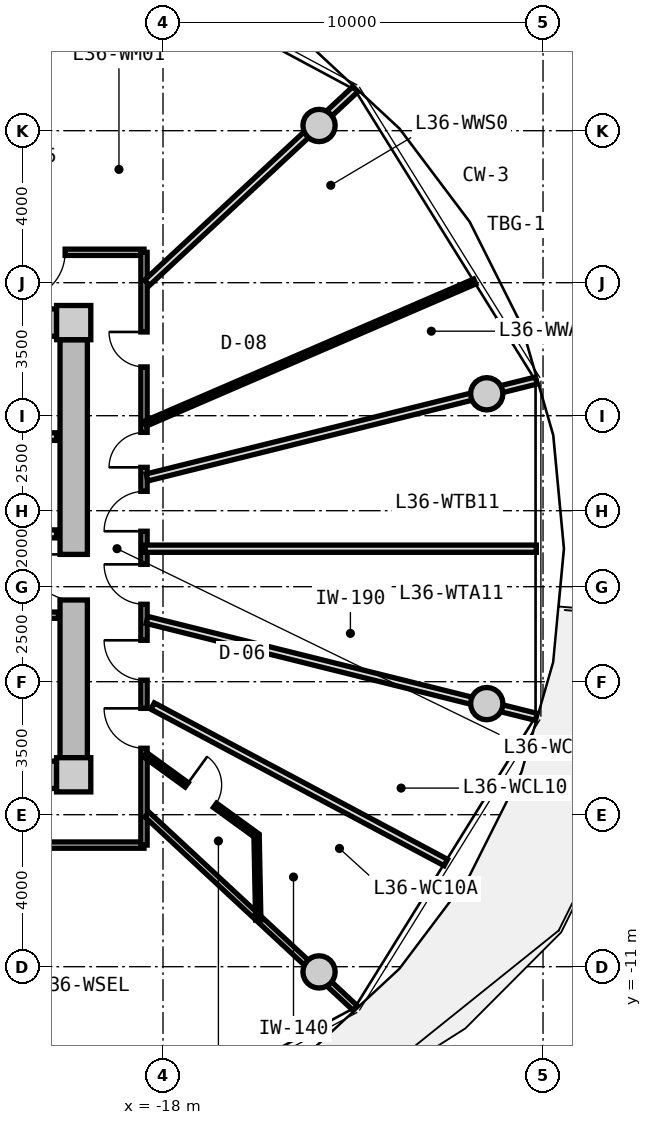
"""IFC4 building model, lengths in metres.
Left out: names, types, materials, properties, quantities, classifications, styles, units other than length and angle.
Written with IfcOpenShell. Run it as: python <this file> out.ifc"""

import sys

from ifc_helpers import new_model, si_unit, direction, frame, frame_2d, origin, origin_2d, place, context, subcontext, project, spatial, rectangle, circle, extrude, source, transform, mapped, element, fill, save


model = new_model("IFC4")
c1 = context("Model", 3, precision=1e-05, world=origin(), true_north=direction((0.0, 1.0)))
c2 = subcontext(c1, "Body", "Model", "MODEL_VIEW")
j1 = project(units=[si_unit("LENGTHUNIT", "METRE"), si_unit("PLANEANGLEUNIT", "RADIAN")], contexts=[c1])
p1 = place(None, origin())
s1 = spatial("IfcSite", under=j1, at=p1, CompositionType="ELEMENT")
p2 = place(p1, origin())
s2 = spatial("IfcBuilding", under=s1, at=p2, CompositionType="ELEMENT")
p3 = place(p2, frame((0.0, 0.0, 117.6)))
s3 = spatial("IfcBuildingStorey", under=s2, at=p3, CompositionType="ELEMENT", Elevation=117.6)
m1 = source(origin(), c2, "Body", "SweptSolid", [
    extrude(rectangle(XDim=0.9, YDim=0.9, at=origin_2d()), origin(), (0.0, 0.0, 1.0), 3.05),
])
for number, where, z_axis, x_axis in (
    (1, (-20.35, -5.95, 0.0), (0.0, 0.0, 1.0), (1.0, 0.0, 0.0)),
    (2, (-20.35, 5.95, 0.0), (0.0, 0.0, 1.0), (1.0, 0.0, 0.0)),
):
    element("IfcColumn", number, at=place(p3, frame(where, z_axis=z_axis, x_axis=x_axis)), inside=s3, PredefinedType="COLUMN", context=c2, shape_type="MappedRepresentation", body=[
        mapped(m1, transform((0.0, 0.0, 0.0), x_axis=(1.0, 0.0, 0.0), y_axis=(0.0, 1.0, 0.0), z_axis=(0.0, 0.0, 1.0), scale=1.0)),
    ])
m2 = source(origin(), c2, "Body", "SweptSolid", [
    extrude(rectangle(XDim=14.4, YDim=0.72, at=frame_2d((7.2, 0.0))), origin(), (0.0, 0.0, 1.0), 2.79),
])
for number, where, z_axis, x_axis in (
    (3, (-35.2, 5.95, 0.0), (0.0, 0.0, 1.0), (1.0, 0.0, 0.0)),
    (4, (-20.8, -5.95, 0.0), (0.0, 0.0, 1.0), (-1.0, 0.0, 0.0)),
):
    element("IfcWall", number, at=place(p3, frame(where, z_axis=z_axis, x_axis=x_axis)), inside=s3, PredefinedType="SHEAR", context=c2, shape_type="MappedRepresentation", body=[
        mapped(m2, transform((0.0, 0.0, 0.0), x_axis=(1.0, 0.0, 0.0), y_axis=(0.0, 1.0, 0.0), z_axis=(0.0, 0.0, 1.0), scale=1.0)),
    ])
m3 = source(origin(), c2, "Body", "SweptSolid", [
    extrude(rectangle(XDim=11.0, YDim=0.72, at=frame_2d((5.5, 0.0))), origin(), (0.0, 0.0, 1.0), 2.79),
])
p4 = place(p3, frame((-20.35, 5.5, 0.0), z_axis=(0.0, 0.0, 1.0), x_axis=(0.0, -1.0, 0.0)))
e5 = element("IfcWall", 5, at=p4, inside=s3, PredefinedType="SHEAR", context=c2, shape_type="MappedRepresentation", body=[
    mapped(m3, transform((0.0, 0.0, 0.0), x_axis=(1.0, 0.0, 0.0), y_axis=(0.0, 1.0, 0.0), z_axis=(0.0, 0.0, 1.0), scale=1.0)),
])
p5 = place(p4, frame((5.65, 0.0, 0.0)))
e6 = element("IfcOpeningElement", 6, at=p5, cuts=e5, PredefinedType="OPENING", context=c2, shape_type="SweptSolid", body=[
    extrude(rectangle(XDim=1.2, YDim=2.15, at=frame_2d((0.6, 1.075))), frame((0.0, 0.37, 0.0), z_axis=(0.0, -1.0, 0.0), x_axis=(1.0, 0.0, 0.0)), (0.0, 0.0, 1.0), 0.74),
])
m4 = source(origin(), c2, "Body", "SweptSolid", [
    extrude(circle(Radius=0.425, at=origin_2d()), origin(), (0.0, 0.0, 1.0), 3.05),
])
for number, where, z_axis, x_axis in (
    (7, (-9.481, 4.076, 0.0), (0.0, 0.0, 1.0), (1.0, 0.0, 0.0)),
    (8, (-13.894, 11.137, 0.0), (0.0, 0.0, 1.0), (1.0, 0.0, 0.0)),
    (9, (-13.894, -11.137, 0.0), (0.0, 0.0, 1.0), (1.0, 0.0, 0.0)),
    (10, (-9.481, -4.076, 0.0), (0.0, 0.0, 1.0), (1.0, 0.0, 0.0)),
):
    element("IfcColumn", number, at=place(p3, frame(where, z_axis=z_axis, x_axis=x_axis)), inside=s3, PredefinedType="COLUMN", context=c2, shape_type="MappedRepresentation", body=[
        mapped(m4, transform((0.0, 0.0, 0.0), x_axis=(1.0, 0.0, 0.0), y_axis=(0.0, 1.0, 0.0), z_axis=(0.0, 0.0, 1.0), scale=1.0)),
    ])
m5 = source(origin(), c2, "Body", "SweptSolid", [
    extrude(rectangle(XDim=3.2, YDim=0.2, at=frame_2d((1.6, 0.0))), origin(), (0.0, 0.0, 1.0), 2.775),
])
p6 = place(p3, frame((-24.0, 2.95, 0.0), z_axis=(0.0, 0.0, 1.0), x_axis=(1.0, 0.0, 0.0)))
e11 = element("IfcWall", 11, at=p6, inside=s3, PredefinedType="PARTITIONING", context=c2, shape_type="MappedRepresentation", body=[
    mapped(m5, transform((0.0, 0.0, 0.0), x_axis=(1.0, 0.0, 0.0), y_axis=(0.0, 1.0, 0.0), z_axis=(0.0, 0.0, 1.0), scale=1.0)),
])
m6 = source(origin(), c2, "Body", "SweptSolid", [
    extrude(rectangle(XDim=6.66, YDim=0.21, at=frame_2d((3.33, 0.0))), origin(), (0.0, 0.0, 1.0), 2.775),
])
p7 = place(p3, frame((-27.46, 0.39, 0.0), z_axis=(0.0, 0.0, 1.0), x_axis=(1.0, 0.0, 0.0)))
e12 = element("IfcWall", 12, at=p7, inside=s3, PredefinedType="PARTITIONING", context=c2, shape_type="MappedRepresentation", body=[
    mapped(m6, transform((0.0, 0.0, 0.0), x_axis=(1.0, 0.0, 0.0), y_axis=(0.0, 1.0, 0.0), z_axis=(0.0, 0.0, 1.0), scale=1.0)),
])
p8 = place(p7, frame((1.0, 0.0, 0.0)))
e13 = element("IfcOpeningElement", 13, at=p8, cuts=e12, PredefinedType="OPENING", context=c2, shape_type="SweptSolid", body=[
    extrude(rectangle(XDim=1.2, YDim=2.15, at=frame_2d((0.6, 1.075))), frame((0.0, 0.115, 0.0), z_axis=(0.0, -1.0, 0.0), x_axis=(1.0, 0.0, 0.0)), (0.0, 0.0, 1.0), 0.23),
])
m7 = source(origin(), c2, "Body", "SweptSolid", [
    extrude(rectangle(XDim=2.7, YDim=0.165, at=frame_2d((1.35, 0.0))), origin(), (0.0, 0.0, 1.0), 2.775),
])
p9 = place(p3, frame((-23.45, -1.75, 0.0), z_axis=(0.0, 0.0, 1.0), x_axis=(1.0, 0.0, 0.0)))
e14 = element("IfcWall", 14, at=p9, inside=s3, PredefinedType="PARTITIONING", context=c2, shape_type="MappedRepresentation", body=[
    mapped(m7, transform((0.0, 0.0, 0.0), x_axis=(1.0, 0.0, 0.0), y_axis=(0.0, 1.0, 0.0), z_axis=(0.0, 0.0, 1.0), scale=1.0)),
])
p10 = place(p9, frame((0.85, 0.0, 0.0)))
e15 = element("IfcOpeningElement", 15, at=p10, cuts=e14, PredefinedType="OPENING", context=c2, shape_type="SweptSolid", body=[
    extrude(rectangle(XDim=0.925, YDim=2.1, at=frame_2d((0.462, 1.05))), frame((0.0, 0.093, 0.0), z_axis=(0.0, -1.0, 0.0), x_axis=(1.0, 0.0, 0.0)), (0.0, 0.0, 1.0), 0.185),
])
m8 = source(origin(), c2, "Body", "SweptSolid", [
    extrude(rectangle(XDim=8.6, YDim=0.165, at=frame_2d((4.3, 0.0))), origin(), (0.0, 0.0, 1.0), 2.775),
])
p11 = place(p3, frame((-27.1, 7.8, 0.0), z_axis=(0.0, 0.0, 1.0), x_axis=(1.0, 0.0, 0.0)))
e16 = element("IfcWall", 16, at=p11, inside=s3, PredefinedType="PARTITIONING", context=c2, shape_type="MappedRepresentation", body=[
    mapped(m8, transform((0.0, 0.0, 0.0), x_axis=(1.0, 0.0, 0.0), y_axis=(0.0, 1.0, 0.0), z_axis=(0.0, 0.0, 1.0), scale=1.0)),
])
p12 = place(p11, frame((5.275, 0.0, 0.0)))
e17 = element("IfcOpeningElement", 17, at=p12, cuts=e16, PredefinedType="OPENING", context=c2, shape_type="SweptSolid", body=[
    extrude(rectangle(XDim=1.25, YDim=2.2, at=frame_2d((0.625, 1.1))), frame((0.0, 0.093, 0.0), z_axis=(0.0, -1.0, 0.0), x_axis=(1.0, 0.0, 0.0)), (0.0, 0.0, 1.0), 0.185),
])
p13 = place(p3, frame((-18.5, -7.8, 0.0), z_axis=(0.0, 0.0, 1.0), x_axis=(-1.0, 0.0, 0.0)))
e18 = element("IfcWall", 18, at=p13, inside=s3, PredefinedType="PARTITIONING", context=c2, shape_type="MappedRepresentation", body=[
    mapped(m8, transform((0.0, 0.0, 0.0), x_axis=(1.0, 0.0, 0.0), y_axis=(0.0, 1.0, 0.0), z_axis=(0.0, 0.0, 1.0), scale=1.0)),
])
p14 = place(p13, frame((3.775, 0.0, 0.0)))
e19 = element("IfcOpeningElement", 19, at=p14, cuts=e18, PredefinedType="OPENING", context=c2, shape_type="SweptSolid", body=[
    extrude(rectangle(XDim=1.05, YDim=2.15, at=frame_2d((0.525, 1.075))), frame((0.0, 0.093, 0.0), z_axis=(0.0, -1.0, 0.0), x_axis=(1.0, 0.0, 0.0)), (0.0, 0.0, 1.0), 0.185),
])
m9 = source(origin(), c2, "Body", "SweptSolid", [
    extrude(rectangle(XDim=15.6, YDim=0.165, at=frame_2d((7.8, 0.0))), origin(), (0.0, 0.0, 1.0), 2.775),
])
p15 = place(p3, frame((-18.5, 7.8, 0.0), z_axis=(0.0, 0.0, 1.0), x_axis=(0.0, -1.0, 0.0)))
e20 = element("IfcWall", 20, at=p15, inside=s3, PredefinedType="PARTITIONING", context=c2, shape_type="MappedRepresentation", body=[
    mapped(m9, transform((0.0, 0.0, 0.0), x_axis=(1.0, 0.0, 0.0), y_axis=(0.0, 1.0, 0.0), z_axis=(0.0, 0.0, 1.0), scale=1.0)),
])
p16 = place(p15, frame((12.002, 0.0, 0.0)))
e21 = element("IfcOpeningElement", 21, at=p16, cuts=e20, PredefinedType="OPENING", context=c2, shape_type="SweptSolid", body=[
    extrude(rectangle(XDim=1.05, YDim=2.15, at=frame_2d((0.525, 1.075))), frame((0.0, 0.093, 0.0), z_axis=(0.0, -1.0, 0.0), x_axis=(1.0, 0.0, 0.0)), (0.0, 0.0, 1.0), 0.185),
])
p17 = place(p15, frame((10.211, 0.0, 0.0)))
e22 = element("IfcOpeningElement", 22, at=p17, cuts=e20, PredefinedType="OPENING", context=c2, shape_type="SweptSolid", body=[
    extrude(rectangle(XDim=1.05, YDim=2.15, at=frame_2d((0.525, 1.075))), frame((0.0, 0.093, 0.0), z_axis=(0.0, -1.0, 0.0), x_axis=(1.0, 0.0, 0.0)), (0.0, 0.0, 1.0), 0.185),
])
p18 = place(p15, frame((8.212, 0.0, 0.0)))
e23 = element("IfcOpeningElement", 23, at=p18, cuts=e20, PredefinedType="OPENING", context=c2, shape_type="SweptSolid", body=[
    extrude(rectangle(XDim=1.05, YDim=2.15, at=frame_2d((0.525, 1.075))), frame((0.0, 0.093, 0.0), z_axis=(0.0, -1.0, 0.0), x_axis=(1.0, 0.0, 0.0)), (0.0, 0.0, 1.0), 0.185),
])
p19 = place(p15, frame((6.291, 0.0, 0.0)))
e24 = element("IfcOpeningElement", 24, at=p19, cuts=e20, PredefinedType="OPENING", context=c2, shape_type="SweptSolid", body=[
    extrude(rectangle(XDim=1.05, YDim=2.15, at=frame_2d((0.525, 1.075))), frame((0.0, 0.093, 0.0), z_axis=(0.0, -1.0, 0.0), x_axis=(1.0, 0.0, 0.0)), (0.0, 0.0, 1.0), 0.185),
])
p20 = place(p15, frame((4.739, 0.0, 0.0)))
e25 = element("IfcOpeningElement", 25, at=p20, cuts=e20, PredefinedType="OPENING", context=c2, shape_type="SweptSolid", body=[
    extrude(rectangle(XDim=0.92, YDim=2.1, at=frame_2d((0.46, 1.05))), frame((0.0, 0.093, 0.0), z_axis=(0.0, -1.0, 0.0), x_axis=(1.0, 0.0, 0.0)), (0.0, 0.0, 1.0), 0.185),
])
p21 = place(p15, frame((2.096, 0.0, 0.0)))
e26 = element("IfcOpeningElement", 26, at=p21, cuts=e20, PredefinedType="OPENING", context=c2, shape_type="SweptSolid", body=[
    extrude(rectangle(XDim=0.92, YDim=2.1, at=frame_2d((0.46, 1.05))), frame((0.0, 0.093, 0.0), z_axis=(0.0, -1.0, 0.0), x_axis=(1.0, 0.0, 0.0)), (0.0, 0.0, 1.0), 0.185),
])
m10 = source(origin(), c2, "Body", "SweptSolid", [
    extrude(rectangle(XDim=7.482, YDim=0.165, at=frame_2d((3.741, 0.0))), origin(), (0.0, 0.0, 1.0), 2.275),
])
p22 = place(p3, frame((-18.42, -6.998, 0.0), z_axis=(0.0, 0.0, 1.0), x_axis=(0.732508698043, -0.680757671489, 0.0)))
e27 = element("IfcWall", 27, at=p22, inside=s3, PredefinedType="PARTITIONING", context=c2, shape_type="MappedRepresentation", body=[
    mapped(m10, transform((0.0, 0.0, 0.0), x_axis=(1.0, 0.0, 0.0), y_axis=(0.0, 1.0, 0.0), z_axis=(0.0, 0.0, 1.0), scale=1.0)),
])
m11 = source(origin(), c2, "Body", "SweptSolid", [
    extrude(rectangle(XDim=10.556, YDim=0.19, at=frame_2d((5.278, 0.0))), origin(), (0.0, 0.0, 1.0), 2.275),
])
p23 = place(p3, frame((-18.42, -1.875, 0.0), z_axis=(0.0, 0.0, 1.0), x_axis=(0.970363857851, -0.241648470667, 0.0)))
e28 = element("IfcWall", 28, at=p23, inside=s3, PredefinedType="PARTITIONING", context=c2, shape_type="MappedRepresentation", body=[
    mapped(m11, transform((0.0, 0.0, 0.0), x_axis=(1.0, 0.0, 0.0), y_axis=(0.0, 1.0, 0.0), z_axis=(0.0, 0.0, 1.0), scale=1.0)),
])
m12 = source(origin(), c2, "Body", "SweptSolid", [
    extrude(rectangle(XDim=8.744, YDim=0.19, at=frame_2d((4.372, 0.0))), origin(), (0.0, 0.0, 1.0), 2.775),
])
p24 = place(p3, frame((-18.273, -4.142, 0.0), z_axis=(0.0, 0.0, 1.0), x_axis=(0.882252449936, -0.470776607938, 0.0)))
e29 = element("IfcWall", 29, at=p24, inside=s3, PredefinedType="PARTITIONING", context=c2, shape_type="MappedRepresentation", body=[
    mapped(m12, transform((0.0, 0.0, 0.0), x_axis=(1.0, 0.0, 0.0), y_axis=(0.0, 1.0, 0.0), z_axis=(0.0, 0.0, 1.0), scale=1.0)),
])
m13 = source(origin(), c2, "Body", "SweptSolid", [
    extrude(rectangle(XDim=3.621, YDim=0.14, at=frame_2d((1.811, 0.0))), origin(), (0.0, 0.0, 1.0), 2.775),
])
p25 = place(p3, frame((-18.47, -5.422, 0.0), z_axis=(0.0, 0.0, 1.0), x_axis=(0.80968252222, -0.586868139544, 0.0)))
e30 = element("IfcWall", 30, at=p25, inside=s3, PredefinedType="PARTITIONING", context=c2, shape_type="MappedRepresentation", body=[
    mapped(m13, transform((0.0, 0.0, 0.0), x_axis=(1.0, 0.0, 0.0), y_axis=(0.0, 1.0, 0.0), z_axis=(0.0, 0.0, 1.0), scale=1.0)),
])
p26 = place(p25, frame((1.351, 0.0, 0.0)))
e31 = element("IfcOpeningElement", 31, at=p26, cuts=e30, PredefinedType="OPENING", context=c2, shape_type="SweptSolid", body=[
    extrude(rectangle(XDim=0.92, YDim=2.1, at=frame_2d((0.46, 1.05))), frame((0.0, 0.08, 0.0), z_axis=(0.0, -1.0, 0.0), x_axis=(1.0, 0.0, 0.0)), (0.0, 0.0, 1.0), 0.16),
])
m14 = source(origin(), c2, "Body", "SweptSolid", [
    extrude(rectangle(XDim=2.225, YDim=0.14, at=frame_2d((1.112, 0.0))), origin(), (0.0, 0.0, 1.0), 2.775),
])
p27 = place(p3, frame((-15.538, -7.547, 0.0), z_axis=(0.0, 0.0, 1.0), x_axis=(0.019971869027, -0.999800542332, 0.0)))
e32 = element("IfcWall", 32, at=p27, inside=s3, PredefinedType="PARTITIONING", context=c2, shape_type="MappedRepresentation", body=[
    mapped(m14, transform((0.0, 0.0, 0.0), x_axis=(1.0, 0.0, 0.0), y_axis=(0.0, 1.0, 0.0), z_axis=(0.0, 0.0, 1.0), scale=1.0)),
])
p28 = place(p3, frame((-18.42, 1.875, 0.0), z_axis=(0.0, 0.0, 1.0), x_axis=(0.970363857851, 0.241648470667, 0.0)))
e33 = element("IfcWall", 33, at=p28, inside=s3, PredefinedType="PARTITIONING", context=c2, shape_type="MappedRepresentation", body=[
    mapped(m11, transform((0.0, 0.0, 0.0), x_axis=(1.0, 0.0, 0.0), y_axis=(0.0, 1.0, 0.0), z_axis=(0.0, 0.0, 1.0), scale=1.0)),
])
m15 = source(origin(), c2, "Body", "SweptSolid", [
    extrude(rectangle(XDim=10.293, YDim=0.19, at=frame_2d((5.146, 0.0))), origin(), (0.0, 0.0, 1.0), 2.775),
])
p29 = place(p3, frame((-18.47, 0.0, 0.0), z_axis=(0.0, 0.0, 1.0), x_axis=(1.0, 0.0, 0.0)))
e34 = element("IfcWall", 34, at=p29, inside=s3, PredefinedType="PARTITIONING", context=c2, shape_type="MappedRepresentation", body=[
    mapped(m15, transform((0.0, 0.0, 0.0), x_axis=(1.0, 0.0, 0.0), y_axis=(0.0, 1.0, 0.0), z_axis=(0.0, 0.0, 1.0), scale=1.0)),
])
m16 = source(origin(), c2, "Body", "SweptSolid", [
    extrude(rectangle(XDim=7.482, YDim=0.19, at=frame_2d((3.741, 0.0))), origin(), (0.0, 0.0, 1.0), 2.275),
])
p30 = place(p3, frame((-18.42, 6.998, 0.0), z_axis=(0.0, 0.0, 1.0), x_axis=(0.732508698043, 0.680757671489, 0.0)))
e35 = element("IfcWall", 35, at=p30, inside=s3, PredefinedType="PARTITIONING", context=c2, shape_type="MappedRepresentation", body=[
    mapped(m16, transform((0.0, 0.0, 0.0), x_axis=(1.0, 0.0, 0.0), y_axis=(0.0, 1.0, 0.0), z_axis=(0.0, 0.0, 1.0), scale=1.0)),
])
m17 = source(origin(), c2, "Body", "SweptSolid", [
    extrude(rectangle(XDim=9.447, YDim=0.14, at=frame_2d((4.724, 0.0))), origin(), (0.0, 0.0, 1.0), 2.775),
])
p31 = place(p3, frame((-18.47, 3.289, 0.0), z_axis=(0.0, 0.0, 1.0), x_axis=(0.918162367414, 0.396204324894, 0.0)))
e36 = element("IfcWall", 36, at=p31, inside=s3, PredefinedType="PARTITIONING", context=c2, shape_type="MappedRepresentation", body=[
    mapped(m17, transform((0.0, 0.0, 0.0), x_axis=(1.0, 0.0, 0.0), y_axis=(0.0, 1.0, 0.0), z_axis=(0.0, 0.0, 1.0), scale=1.0)),
])
m18 = source(origin(), c2, "Body", "SweptSolid", [
    extrude(rectangle(XDim=1.2, YDim=2.15, at=frame_2d((0.6, 1.075))), frame((0.0, 0.025, 0.0), z_axis=(0.0, -1.0, 0.0), x_axis=(1.0, 0.0, 0.0)), (0.0, 0.0, 1.0), 0.05),
])
p32 = place(p5, frame((1.2, 0.0, 0.0), z_axis=(0.0, 0.0, 1.0), x_axis=(-1.0, 0.0, 0.0)))
e37 = element("IfcDoor", 37, at=p32, inside=s3, OperationType="SINGLE_SWING_RIGHT", PredefinedType="DOOR", context=c2, shape_type="MappedRepresentation", body=[
    mapped(m18, transform((0.0, 0.0, 0.0), x_axis=(1.0, 0.0, 0.0), y_axis=(0.0, 1.0, 0.0), z_axis=(0.0, 0.0, 1.0), scale=1.0)),
])
fill(e6, e37)
m19 = source(origin(), c2, "Body", "SweptSolid", [
    extrude(rectangle(XDim=1.05, YDim=2.15, at=frame_2d((0.525, 1.075))), frame((0.0, 0.025, 0.0), z_axis=(0.0, -1.0, 0.0), x_axis=(1.0, 0.0, 0.0)), (0.0, 0.0, 1.0), 0.05),
])
p33 = place(p16, frame((1.05, 0.0, 0.0), z_axis=(0.0, 0.0, 1.0), x_axis=(-1.0, 0.0, 0.0)))
e38 = element("IfcDoor", 38, at=p33, inside=s3, OperationType="SINGLE_SWING_RIGHT", PredefinedType="DOOR", context=c2, shape_type="MappedRepresentation", body=[
    mapped(m19, transform((0.0, 0.0, 0.0), x_axis=(1.0, 0.0, 0.0), y_axis=(0.0, 1.0, 0.0), z_axis=(0.0, 0.0, 1.0), scale=1.0)),
])
fill(e21, e38)
m20 = source(origin(), c2, "Body", "SweptSolid", [
    extrude(rectangle(XDim=0.92, YDim=2.1, at=frame_2d((0.46, 1.05))), frame((0.0, 0.025, 0.0), z_axis=(0.0, -1.0, 0.0), x_axis=(1.0, 0.0, 0.0)), (0.0, 0.0, 1.0), 0.05),
])
p34 = place(p26, origin())
e39 = element("IfcDoor", 39, at=p34, inside=s3, OperationType="SINGLE_SWING_LEFT", PredefinedType="DOOR", context=c2, shape_type="MappedRepresentation", body=[
    mapped(m20, transform((0.0, 0.0, 0.0), x_axis=(1.0, 0.0, 0.0), y_axis=(0.0, 1.0, 0.0), z_axis=(0.0, 0.0, 1.0), scale=1.0)),
])
fill(e31, e39)
p35 = place(p17, frame((1.05, 0.0, 0.0), z_axis=(0.0, 0.0, 1.0), x_axis=(-1.0, 0.0, 0.0)))
e40 = element("IfcDoor", 40, at=p35, inside=s3, OperationType="SINGLE_SWING_RIGHT", PredefinedType="DOOR", context=c2, shape_type="MappedRepresentation", body=[
    mapped(m19, transform((0.0, 0.0, 0.0), x_axis=(1.0, 0.0, 0.0), y_axis=(0.0, 1.0, 0.0), z_axis=(0.0, 0.0, 1.0), scale=1.0)),
])
fill(e22, e40)
p36 = place(p18, frame((1.05, 0.0, 0.0), z_axis=(0.0, 0.0, 1.0), x_axis=(-1.0, 0.0, 0.0)))
e41 = element("IfcDoor", 41, at=p36, inside=s3, OperationType="SINGLE_SWING_RIGHT", PredefinedType="DOOR", context=c2, shape_type="MappedRepresentation", body=[
    mapped(m19, transform((0.0, 0.0, 0.0), x_axis=(1.0, 0.0, 0.0), y_axis=(0.0, 1.0, 0.0), z_axis=(0.0, 0.0, 1.0), scale=1.0)),
])
fill(e23, e41)
p37 = place(p19, frame((1.05, 0.0, 0.0), z_axis=(0.0, 0.0, 1.0), x_axis=(-1.0, 0.0, 0.0)))
e42 = element("IfcDoor", 42, at=p37, inside=s3, OperationType="SINGLE_SWING_LEFT", PredefinedType="DOOR", context=c2, shape_type="MappedRepresentation", body=[
    mapped(m19, transform((0.0, 0.0, 0.0), x_axis=(1.0, 0.0, 0.0), y_axis=(0.0, 1.0, 0.0), z_axis=(0.0, 0.0, 1.0), scale=1.0)),
])
fill(e24, e42)
p38 = place(p20, frame((0.92, 0.0, 0.0), z_axis=(0.0, 0.0, 1.0), x_axis=(-1.0, 0.0, 0.0)))
e43 = element("IfcDoor", 43, at=p38, inside=s3, OperationType="SINGLE_SWING_LEFT", PredefinedType="DOOR", context=c2, shape_type="MappedRepresentation", body=[
    mapped(m20, transform((0.0, 0.0, 0.0), x_axis=(1.0, 0.0, 0.0), y_axis=(0.0, 1.0, 0.0), z_axis=(0.0, 0.0, 1.0), scale=1.0)),
])
fill(e25, e43)
p39 = place(p21, frame((0.92, 0.0, 0.0), z_axis=(0.0, 0.0, 1.0), x_axis=(-1.0, 0.0, 0.0)))
e44 = element("IfcDoor", 44, at=p39, inside=s3, OperationType="SINGLE_SWING_RIGHT", PredefinedType="DOOR", context=c2, shape_type="MappedRepresentation", body=[
    mapped(m20, transform((0.0, 0.0, 0.0), x_axis=(1.0, 0.0, 0.0), y_axis=(0.0, 1.0, 0.0), z_axis=(0.0, 0.0, 1.0), scale=1.0)),
])
fill(e26, e44)
m21 = source(origin(), c2, "Body", "SweptSolid", [
    extrude(rectangle(XDim=1.25, YDim=2.2, at=frame_2d((0.625, 1.1))), frame((0.0, 0.025, 0.0), z_axis=(0.0, -1.0, 0.0), x_axis=(1.0, 0.0, 0.0)), (0.0, 0.0, 1.0), 0.05),
])
p40 = place(p12, frame((1.25, 0.0, 0.0), z_axis=(0.0, 0.0, 1.0), x_axis=(-1.0, 0.0, 0.0)))
e45 = element("IfcDoor", 45, at=p40, inside=s3, OperationType="SINGLE_SWING_RIGHT", PredefinedType="DOOR", context=c2, shape_type="MappedRepresentation", body=[
    mapped(m21, transform((0.0, 0.0, 0.0), x_axis=(1.0, 0.0, 0.0), y_axis=(0.0, 1.0, 0.0), z_axis=(0.0, 0.0, 1.0), scale=1.0)),
])
fill(e17, e45)
save(model, sys.argv[1])
